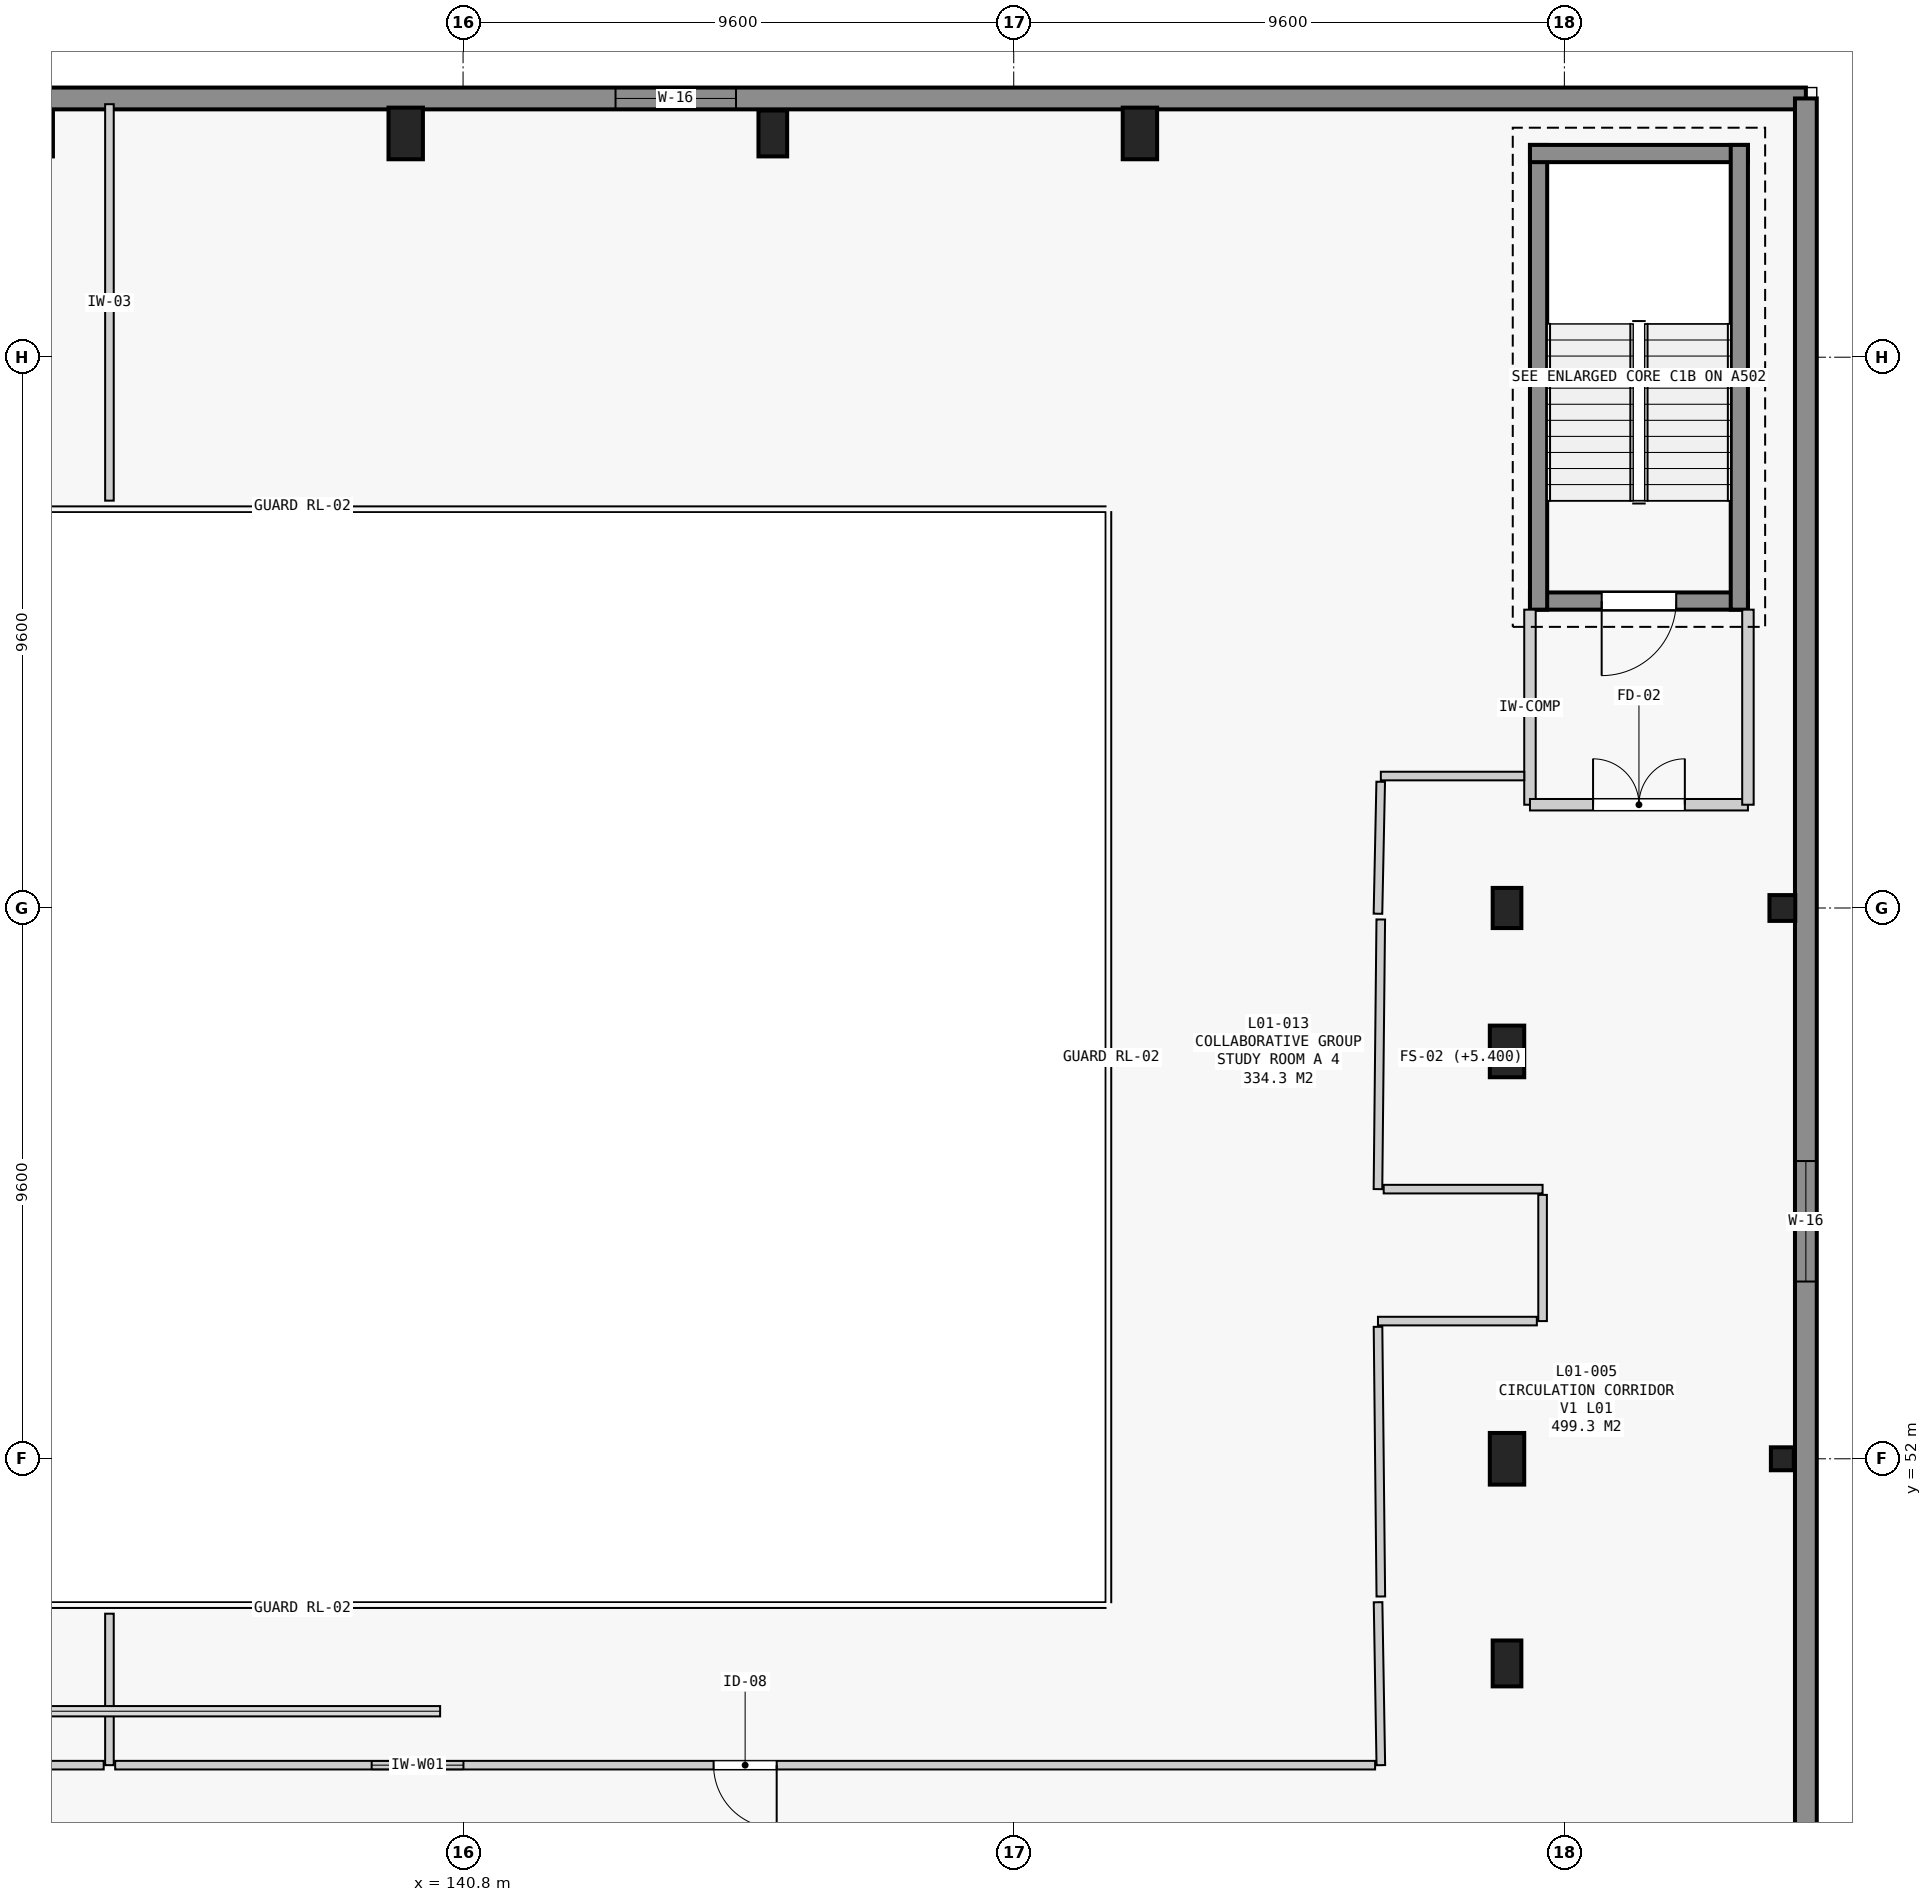
"""IFC4 building model, lengths in metres.
Left out: names, types, materials, properties, quantities, classifications, styles, units other than length and angle.
Written with IfcOpenShell. Run it as: python <this file> out.ifc"""

import sys

from ifc_helpers import new_model, si_unit, direction, frame, frame_2d, origin, origin_2d, place, context, subcontext, project, spatial, rectangle, extrude, element, fill, save


model = new_model("IFC4")
c1 = context("Model", 3, precision=1e-05, world=origin(), true_north=direction((0.0, 1.0)))
c2 = subcontext(c1, "Body", "Model", "MODEL_VIEW")
j1 = project(units=[si_unit("LENGTHUNIT", "METRE"), si_unit("PLANEANGLEUNIT", "RADIAN")], contexts=[c1])
p1 = place(None, origin())
s1 = spatial("IfcSite", under=j1, at=p1, CompositionType="ELEMENT")
p2 = place(p1, origin())
s2 = spatial("IfcBuilding", under=s1, at=p2, CompositionType="ELEMENT")
p3 = place(p2, frame((0.0, 0.0, 5.4)))
s3 = spatial("IfcBuildingStorey", under=s2, at=p3, CompositionType="ELEMENT", Elevation=5.4)
p4 = place(p3, frame((159.0, 52.0, 0.0), z_axis=(0.0, 0.0, 1.0), x_axis=(1.0, 0.0, 0.0)))
e1 = element("IfcColumn", 1, at=p4, inside=s3, PredefinedType="COLUMN", context=c2, shape_type="SweptSolid", body=[
    extrude(rectangle(XDim=0.6, YDim=0.9, at=origin_2d()), origin(), (0.0, 0.0, 1.0), 4.2),
])
p5 = place(p3, frame((159.0, 61.6, 0.0), z_axis=(0.0, 0.0, 1.0), x_axis=(1.0, 0.0, 0.0)))
e2 = element("IfcColumn", 2, at=p5, inside=s3, PredefinedType="COLUMN", context=c2, shape_type="SweptSolid", body=[
    extrude(rectangle(XDim=0.5, YDim=0.7, at=origin_2d()), origin(), (0.0, 0.0, 1.0), 4.2),
])
p6 = place(p3, frame((163.8, 52.0, 0.0), z_axis=(0.0, 0.0, 1.0), x_axis=(1.0, 0.0, 0.0)))
e3 = element("IfcColumn", 3, at=p6, inside=s3, PredefinedType="COLUMN", context=c2, shape_type="SweptSolid", body=[
    extrude(rectangle(XDim=0.4, YDim=0.4, at=origin_2d()), origin(), (0.0, 0.0, 1.0), 4.2),
])
p7 = place(p3, frame((163.8, 61.6, 0.0), z_axis=(0.0, 0.0, 1.0), x_axis=(1.0, 0.0, 0.0)))
e4 = element("IfcColumn", 4, at=p7, inside=s3, PredefinedType="COLUMN", context=c2, shape_type="SweptSolid", body=[
    extrude(rectangle(XDim=0.45, YDim=0.45, at=origin_2d()), origin(), (0.0, 0.0, 1.0), 4.2),
])
p8 = place(p3, frame((133.4, 75.1, 0.0), z_axis=(0.0, 0.0, 1.0), x_axis=(1.0, 0.0, 0.0)))
e5 = element("IfcColumn", 5, at=p8, inside=s3, PredefinedType="COLUMN", context=c2, shape_type="SweptSolid", body=[
    extrude(rectangle(XDim=0.5, YDim=0.8, at=origin_2d()), origin(), (0.0, 0.0, 1.0), 4.2),
])
p9 = place(p3, frame((139.8, 75.1, 0.0), z_axis=(0.0, 0.0, 1.0), x_axis=(1.0, 0.0, 0.0)))
e6 = element("IfcColumn", 6, at=p9, inside=s3, PredefinedType="COLUMN", context=c2, shape_type="SweptSolid", body=[
    extrude(rectangle(XDim=0.6, YDim=0.9, at=origin_2d()), origin(), (0.0, 0.0, 1.0), 4.2),
])
p10 = place(p3, frame((146.2, 75.1, 0.0), z_axis=(0.0, 0.0, 1.0), x_axis=(1.0, 0.0, 0.0)))
e7 = element("IfcColumn", 7, at=p10, inside=s3, PredefinedType="COLUMN", context=c2, shape_type="SweptSolid", body=[
    extrude(rectangle(XDim=0.5, YDim=0.8, at=origin_2d()), origin(), (0.0, 0.0, 1.0), 4.2),
])
p11 = place(p3, frame((152.6, 75.1, 0.0), z_axis=(0.0, 0.0, 1.0), x_axis=(1.0, 0.0, 0.0)))
e8 = element("IfcColumn", 8, at=p11, inside=s3, PredefinedType="COLUMN", context=c2, shape_type="SweptSolid", body=[
    extrude(rectangle(XDim=0.6, YDim=0.9, at=origin_2d()), origin(), (0.0, 0.0, 1.0), 4.2),
])
p12 = place(p3, frame((159.0, 48.433, 0.0), z_axis=(0.0, 0.0, 1.0), x_axis=(1.0, 0.0, 0.0)))
e9 = element("IfcColumn", 9, at=p12, inside=s3, PredefinedType="COLUMN", context=c2, shape_type="SweptSolid", body=[
    extrude(rectangle(XDim=0.5, YDim=0.8, at=origin_2d()), origin(), (0.0, 0.0, 1.0), 4.2),
])
p13 = place(p3, frame((159.0, 59.1, 0.0), z_axis=(0.0, 0.0, 1.0), x_axis=(1.0, 0.0, 0.0)))
e10 = element("IfcColumn", 10, at=p13, inside=s3, PredefinedType="COLUMN", context=c2, shape_type="SweptSolid", body=[
    extrude(rectangle(XDim=0.6, YDim=0.9, at=origin_2d()), origin(), (0.0, 0.0, 1.0), 4.2),
])
p14 = place(p3, frame((113.322, 75.71, 0.0), z_axis=(0.0, 0.0, 1.0), x_axis=(1.0, 0.0, 0.0)))
e11 = element("IfcWall", 11, at=p14, inside=s3, PredefinedType="STANDARD", context=c2, shape_type="SweptSolid", body=[
    extrude(rectangle(XDim=50.888, YDim=0.38, at=frame_2d((25.444, 0.0))), origin(), (0.0, 0.0, 1.0), 3.94),
])
p15 = place(p14, frame((16.402, 0.0, 1.05)))
e12 = element("IfcOpeningElement", 12, at=p15, cuts=e11, PredefinedType="OPENING", context=c2, shape_type="SweptSolid", body=[
    extrude(rectangle(XDim=1.8, YDim=2.1, at=frame_2d((0.9, 1.05))), frame((0.0, 0.2, 0.0), z_axis=(0.0, -1.0, 0.0), x_axis=(1.0, 0.0, 0.0)), (0.0, 0.0, 1.0), 0.4),
])
p16 = place(p14, frame((30.136, 0.0, 1.65)))
e13 = element("IfcOpeningElement", 13, at=p16, cuts=e11, PredefinedType="OPENING", context=c2, shape_type="SweptSolid", body=[
    extrude(rectangle(XDim=2.1, YDim=1.6, at=frame_2d((1.05, 0.8))), frame((0.0, 0.2, 0.0), z_axis=(0.0, -1.0, 0.0), x_axis=(1.0, 0.0, 0.0)), (0.0, 0.0, 1.0), 0.4),
])
p17 = place(p3, frame((164.21, 75.71, 0.0), z_axis=(0.0, 0.0, 1.0), x_axis=(0.0, -1.0, 0.0)))
e14 = element("IfcWall", 14, at=p17, inside=s3, PredefinedType="STANDARD", context=c2, shape_type="SweptSolid", body=[
    extrude(rectangle(XDim=33.02, YDim=0.38, at=frame_2d((16.51, 0.0))), origin(), (0.0, 0.0, 1.0), 3.94),
])
p18 = place(p17, frame((18.521, 0.0, 1.65)))
e15 = element("IfcOpeningElement", 15, at=p18, cuts=e14, PredefinedType="OPENING", context=c2, shape_type="SweptSolid", body=[
    extrude(rectangle(XDim=2.1, YDim=1.6, at=frame_2d((1.05, 0.8))), frame((0.0, 0.2, 0.0), z_axis=(0.0, -1.0, 0.0), x_axis=(1.0, 0.0, 0.0)), (0.0, 0.0, 1.0), 0.4),
])
p19 = place(p3, frame((163.2, 66.95, 0.0), z_axis=(0.0, 0.0, 1.0), x_axis=(-1.0, 0.0, 0.0)))
e16 = element("IfcWall", 16, at=p19, inside=s3, PredefinedType="SHEAR", context=c2, shape_type="SweptSolid", body=[
    extrude(rectangle(XDim=3.8, YDim=0.3, at=frame_2d((1.9, 0.0))), origin(), (0.0, 0.0, 1.0), 3.94),
])
p20 = place(p19, frame((1.25, 0.0, 0.0)))
e17 = element("IfcOpeningElement", 17, at=p20, cuts=e16, PredefinedType="OPENING", context=c2, shape_type="SweptSolid", body=[
    extrude(rectangle(XDim=1.3, YDim=2.2, at=frame_2d((0.65, 1.1))), frame((0.0, 0.16, 0.0), z_axis=(0.0, -1.0, 0.0), x_axis=(1.0, 0.0, 0.0)), (0.0, 0.0, 1.0), 0.32),
])
p21 = place(p3, frame((159.55, 66.8, 0.0), z_axis=(0.0, 0.0, 1.0), x_axis=(0.0, 1.0, 0.0)))
e18 = element("IfcWall", 18, at=p21, inside=s3, PredefinedType="SHEAR", context=c2, shape_type="SweptSolid", body=[
    extrude(rectangle(XDim=8.1, YDim=0.3, at=frame_2d((4.05, 0.0))), origin(), (0.0, 0.0, 1.0), 3.94),
])
p22 = place(p3, frame((159.4, 74.75, 0.0), z_axis=(0.0, 0.0, 1.0), x_axis=(1.0, 0.0, 0.0)))
e19 = element("IfcWall", 19, at=p22, inside=s3, PredefinedType="SHEAR", context=c2, shape_type="SweptSolid", body=[
    extrude(rectangle(XDim=3.8, YDim=0.3, at=frame_2d((1.9, 0.0))), origin(), (0.0, 0.0, 1.0), 3.94),
])
p23 = place(p3, frame((163.05, 74.9, 0.0), z_axis=(0.0, 0.0, 1.0), x_axis=(0.0, -1.0, 0.0)))
e20 = element("IfcWall", 20, at=p23, inside=s3, PredefinedType="SHEAR", context=c2, shape_type="SweptSolid", body=[
    extrude(rectangle(XDim=8.1, YDim=0.3, at=frame_2d((4.05, 0.0))), origin(), (0.0, 0.0, 1.0), 3.94),
])
p24 = place(p3, frame((159.4, 66.8, 0.0), z_axis=(0.0, 0.0, 1.0), x_axis=(0.0, -1.0, 0.0)))
e21 = element("IfcWall", 21, at=p24, inside=s3, PredefinedType="STANDARD", context=c2, shape_type="SweptSolid", body=[
    extrude(rectangle(XDim=3.4, YDim=0.2, at=frame_2d((1.7, 0.0))), origin(), (0.0, 0.0, 1.0), 3.94),
])
p25 = place(p3, frame((159.4, 63.4, 0.0), z_axis=(0.0, 0.0, 1.0), x_axis=(1.0, 0.0, 0.0)))
e22 = element("IfcWall", 22, at=p25, inside=s3, PredefinedType="STANDARD", context=c2, shape_type="SweptSolid", body=[
    extrude(rectangle(XDim=3.8, YDim=0.2, at=frame_2d((1.9, 0.0))), origin(), (0.0, 0.0, 1.0), 3.94),
])
p26 = place(p25, frame((1.1, 0.0, 0.0)))
e23 = element("IfcOpeningElement", 23, at=p26, cuts=e22, PredefinedType="OPENING", context=c2, shape_type="SweptSolid", body=[
    extrude(rectangle(XDim=1.6, YDim=2.2, at=frame_2d((0.8, 1.1))), frame((0.0, 0.11, 0.0), z_axis=(0.0, -1.0, 0.0), x_axis=(1.0, 0.0, 0.0)), (0.0, 0.0, 1.0), 0.22),
])
p27 = place(p3, frame((163.2, 63.4, 0.0), z_axis=(0.0, 0.0, 1.0), x_axis=(0.0, 1.0, 0.0)))
e24 = element("IfcWall", 24, at=p27, inside=s3, PredefinedType="STANDARD", context=c2, shape_type="SweptSolid", body=[
    extrude(rectangle(XDim=3.4, YDim=0.2, at=frame_2d((1.7, 0.0))), origin(), (0.0, 0.0, 1.0), 3.94),
])
p28 = place(p3, frame((134.635, 75.61, 0.0), z_axis=(0.0, 0.0, 1.0), x_axis=(0.0, -1.0, 0.0)))
e25 = element("IfcWall", 25, at=p28, inside=s3, PredefinedType="PARTITIONING", context=c2, shape_type="SweptSolid", body=[
    extrude(rectangle(XDim=6.91, YDim=0.15, at=frame_2d((3.455, 0.0))), origin(), (0.0, 0.0, 1.0), 3.12),
])
p29 = place(p3, frame((134.635, 49.3, 0.0), z_axis=(0.0, 0.0, 1.0), x_axis=(0.0, -1.0, 0.0)))
e26 = element("IfcWall", 26, at=p29, inside=s3, PredefinedType="PARTITIONING", context=c2, shape_type="SweptSolid", body=[
    extrude(rectangle(XDim=2.64, YDim=0.15, at=frame_2d((1.32, 0.0))), origin(), (0.0, 0.0, 1.0), 3.94),
])
p30 = place(p3, frame((134.535, 46.66, 0.0), z_axis=(0.0, 0.0, 1.0), x_axis=(-1.0, 0.0, 0.0)))
e27 = element("IfcWall", 27, at=p30, inside=s3, PredefinedType="PARTITIONING", context=c2, shape_type="SweptSolid", body=[
    extrude(rectangle(XDim=8.955, YDim=0.15, at=frame_2d((4.478, 0.0))), origin(), (0.0, 0.0, 1.0), 3.94),
])
p31 = place(p30, frame((3.927, 0.0, 0.0)))
e28 = element("IfcOpeningElement", 28, at=p31, cuts=e27, PredefinedType="OPENING", context=c2, shape_type="SweptSolid", body=[
    extrude(rectangle(XDim=1.1, YDim=2.15, at=frame_2d((0.55, 1.075))), frame((0.0, 0.085, 0.0), z_axis=(0.0, -1.0, 0.0), x_axis=(1.0, 0.0, 0.0)), (0.0, 0.0, 1.0), 0.17),
])
p32 = place(p3, frame((159.3, 63.9, 0.0), z_axis=(0.0, 0.0, 1.0), x_axis=(-1.0, 0.0, 0.0)))
e29 = element("IfcWall", 29, at=p32, inside=s3, PredefinedType="PARTITIONING", context=c2, shape_type="SweptSolid", body=[
    extrude(rectangle(XDim=2.5, YDim=0.15, at=frame_2d((1.25, 0.0))), origin(), (0.0, 0.0, 1.0), 3.94),
])
p33 = place(p3, frame((156.798, 63.8, 0.0), z_axis=(0.0, 0.0, 1.0), x_axis=(-0.020800084529, -0.999783654839, 0.0)))
e30 = element("IfcWall", 30, at=p33, inside=s3, PredefinedType="PARTITIONING", context=c2, shape_type="SweptSolid", body=[
    extrude(rectangle(XDim=2.301, YDim=0.15, at=frame_2d((1.15, 0.0))), origin(), (0.0, 0.0, 1.0), 3.94),
])
p34 = place(p3, frame((156.799, 61.4, 0.0), z_axis=(0.0, 0.0, 1.0), x_axis=(-0.010440446985, -0.999945497048, 0.0)))
e31 = element("IfcWall", 31, at=p34, inside=s3, PredefinedType="PARTITIONING", context=c2, shape_type="SweptSolid", body=[
    extrude(rectangle(XDim=4.7, YDim=0.15, at=frame_2d((2.35, 0.0))), origin(), (0.0, 0.0, 1.0), 3.94),
])
p35 = place(p3, frame((156.85, 56.7, 0.0), z_axis=(0.0, 0.0, 1.0), x_axis=(1.0, 0.0, 0.0)))
e32 = element("IfcWall", 32, at=p35, inside=s3, PredefinedType="PARTITIONING", context=c2, shape_type="SweptSolid", body=[
    extrude(rectangle(XDim=2.77, YDim=0.15, at=frame_2d((1.385, 0.0))), origin(), (0.0, 0.0, 1.0), 3.37),
])
p36 = place(p3, frame((159.62, 56.6, 0.0), z_axis=(0.0, 0.0, 1.0), x_axis=(0.0, -1.0, 0.0)))
e33 = element("IfcWall", 33, at=p36, inside=s3, PredefinedType="PARTITIONING", context=c2, shape_type="SweptSolid", body=[
    extrude(rectangle(XDim=2.2, YDim=0.15, at=frame_2d((1.1, 0.0))), origin(), (0.0, 0.0, 1.0), 3.94),
])
p37 = place(p3, frame((159.52, 54.4, 0.0), z_axis=(0.0, 0.0, 1.0), x_axis=(-1.0, 0.0, 0.0)))
e34 = element("IfcWall", 34, at=p37, inside=s3, PredefinedType="PARTITIONING", context=c2, shape_type="SweptSolid", body=[
    extrude(rectangle(XDim=2.77, YDim=0.15, at=frame_2d((1.385, 0.0))), origin(), (0.0, 0.0, 1.0), 3.37),
])
p38 = place(p3, frame((156.751, 54.3, 0.0), z_axis=(0.0, 0.0, 1.0), x_axis=(0.010440446985, -0.999945497048, 0.0)))
e35 = element("IfcWall", 35, at=p38, inside=s3, PredefinedType="PARTITIONING", context=c2, shape_type="SweptSolid", body=[
    extrude(rectangle(XDim=4.7, YDim=0.15, at=frame_2d((2.35, 0.0))), origin(), (0.0, 0.0, 1.0), 3.94),
])
p39 = place(p3, frame((156.752, 49.5, 0.0), z_axis=(0.0, 0.0, 1.0), x_axis=(0.01701808012, -0.999855181988, 0.0)))
e36 = element("IfcWall", 36, at=p39, inside=s3, PredefinedType="PARTITIONING", context=c2, shape_type="SweptSolid", body=[
    extrude(rectangle(XDim=2.841, YDim=0.15, at=frame_2d((1.42, 0.0))), origin(), (0.0, 0.0, 1.0), 3.94),
])
p40 = place(p3, frame((156.7, 46.66, 0.0), z_axis=(0.0, 0.0, 1.0), x_axis=(-1.0, 0.0, 0.0)))
e37 = element("IfcWall", 37, at=p40, inside=s3, PredefinedType="PARTITIONING", context=c2, shape_type="SweptSolid", body=[
    extrude(rectangle(XDim=21.965, YDim=0.15, at=frame_2d((10.982, 0.0))), origin(), (0.0, 0.0, 1.0), 3.94),
])
p41 = place(p40, frame((10.433, 0.0, 0.0)))
e38 = element("IfcOpeningElement", 38, at=p41, cuts=e37, PredefinedType="OPENING", context=c2, shape_type="SweptSolid", body=[
    extrude(rectangle(XDim=1.1, YDim=2.2, at=frame_2d((0.55, 1.1))), frame((0.0, 0.085, 0.0), z_axis=(0.0, -1.0, 0.0), x_axis=(1.0, 0.0, 0.0)), (0.0, 0.0, 1.0), 0.17),
])
p42 = place(p40, frame((15.893, 0.0, 1.05)))
e39 = element("IfcOpeningElement", 39, at=p42, cuts=e37, PredefinedType="OPENING", context=c2, shape_type="SweptSolid", body=[
    extrude(rectangle(XDim=1.6, YDim=1.5, at=frame_2d((0.8, 0.75))), frame((0.0, 0.085, 0.0), z_axis=(0.0, -1.0, 0.0), x_axis=(1.0, 0.0, 0.0)), (0.0, 0.0, 1.0), 0.17),
])
p43 = place(p16, origin())
e40 = element("IfcWindow", 40, at=p43, inside=s3, PartitioningType="SINGLE_PANEL", PredefinedType="WINDOW", context=c2, shape_type="SweptSolid", body=[
    extrude(rectangle(XDim=2.1, YDim=1.6, at=frame_2d((1.05, 0.8))), frame((0.0, 0.03, 0.0), z_axis=(0.0, -1.0, 0.0), x_axis=(1.0, 0.0, 0.0)), (0.0, 0.0, 1.0), 0.06),
])
fill(e13, e40)
p44 = place(p18, origin())
e41 = element("IfcWindow", 41, at=p44, inside=s3, PartitioningType="SINGLE_PANEL", PredefinedType="WINDOW", context=c2, shape_type="SweptSolid", body=[
    extrude(rectangle(XDim=2.1, YDim=1.6, at=frame_2d((1.05, 0.8))), frame((0.0, 0.03, 0.0), z_axis=(0.0, -1.0, 0.0), x_axis=(1.0, 0.0, 0.0)), (0.0, 0.0, 1.0), 0.06),
])
fill(e15, e41)
p45 = place(p20, origin())
e42 = element("IfcDoor", 42, at=p45, inside=s3, OperationType="SINGLE_SWING_RIGHT", PredefinedType="DOOR", context=c2, shape_type="SweptSolid", body=[
    extrude(rectangle(XDim=1.3, YDim=2.2, at=frame_2d((0.65, 1.1))), frame((0.0, 0.025, 0.0), z_axis=(0.0, -1.0, 0.0), x_axis=(1.0, 0.0, 0.0)), (0.0, 0.0, 1.0), 0.05),
])
fill(e17, e42)
p46 = place(p26, origin())
e43 = element("IfcDoor", 43, at=p46, inside=s3, OperationType="DOUBLE_DOOR_SINGLE_SWING", PredefinedType="DOOR", context=c2, shape_type="SweptSolid", body=[
    extrude(rectangle(XDim=1.6, YDim=2.2, at=frame_2d((0.8, 1.1))), frame((0.0, 0.025, 0.0), z_axis=(0.0, -1.0, 0.0), x_axis=(1.0, 0.0, 0.0)), (0.0, 0.0, 1.0), 0.05),
])
fill(e23, e43)
p47 = place(p41, origin())
e44 = element("IfcDoor", 44, at=p47, inside=s3, OperationType="SINGLE_SWING_LEFT", PredefinedType="DOOR", context=c2, shape_type="SweptSolid", body=[
    extrude(rectangle(XDim=1.1, YDim=2.2, at=frame_2d((0.55, 1.1))), frame((0.0, 0.025, 0.0), z_axis=(0.0, -1.0, 0.0), x_axis=(1.0, 0.0, 0.0)), (0.0, 0.0, 1.0), 0.05),
])
fill(e38, e44)
p48 = place(p42, origin())
e45 = element("IfcWindow", 45, at=p48, inside=s3, PartitioningType="SINGLE_PANEL", PredefinedType="WINDOW", context=c2, shape_type="SweptSolid", body=[
    extrude(rectangle(XDim=1.6, YDim=1.5, at=frame_2d((0.8, 0.75))), frame((0.0, 0.03, 0.0), z_axis=(0.0, -1.0, 0.0), x_axis=(1.0, 0.0, 0.0)), (0.0, 0.0, 1.0), 0.06),
])
fill(e39, e45)
save(model, sys.argv[1])
